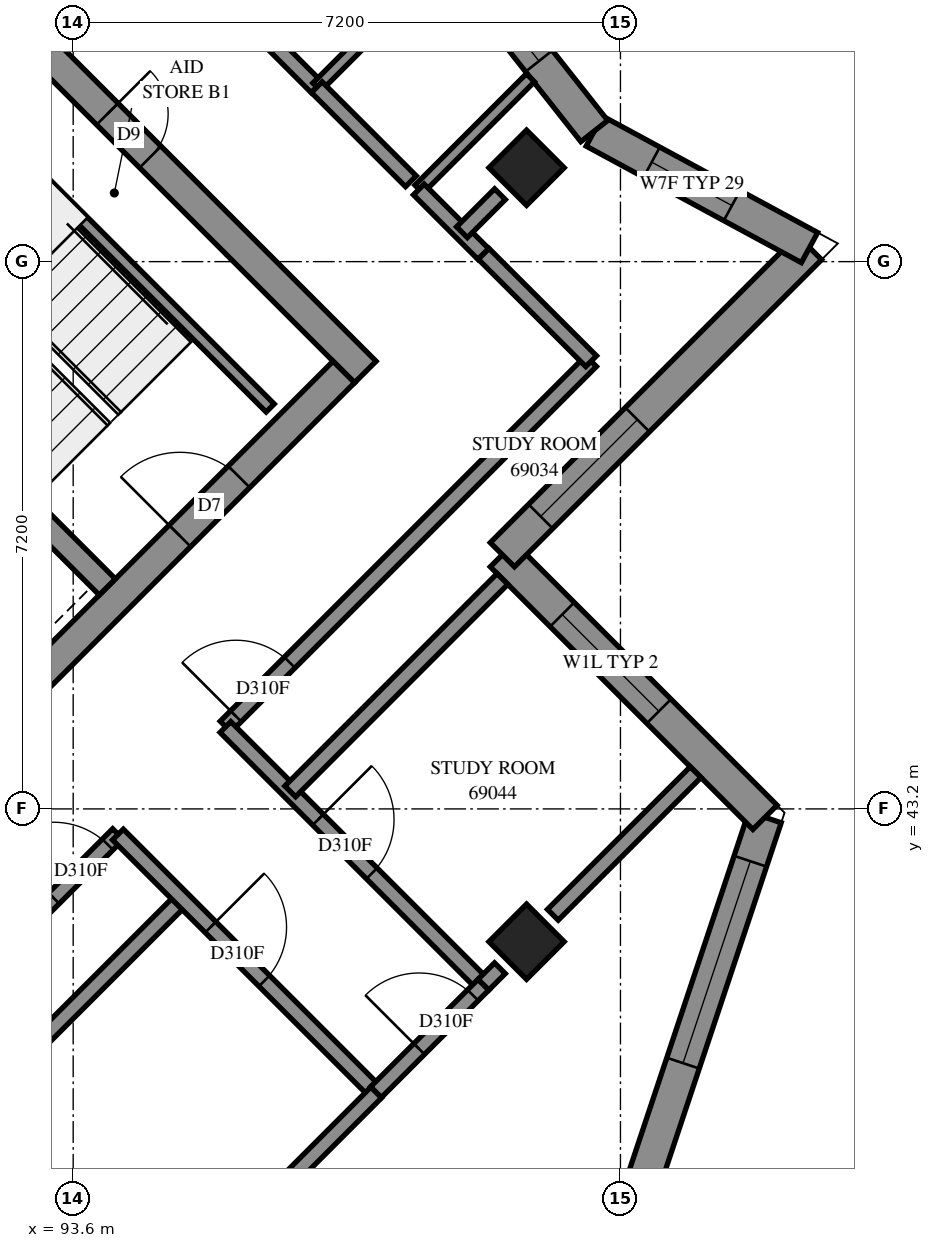
"""IFC4 building model, lengths in metres.
Left out: names, types, materials, properties, quantities, classifications, styles, units other than length and angle.
Written with IfcOpenShell. Run it as: python <this file> out.ifc"""

import sys

from ifc_helpers import new_model, si_unit, direction, frame, frame_2d, origin, origin_2d, place, context, subcontext, project, spatial, polyline, rectangle, outline, extrude, element, fill, save


model = new_model("IFC4")
c1 = context("Model", 3, precision=1e-05, world=origin(), true_north=direction((0.0, 1.0)))
c2 = subcontext(c1, "Body", "Model", "MODEL_VIEW")
j1 = project(units=[si_unit("LENGTHUNIT", "METRE"), si_unit("PLANEANGLEUNIT", "RADIAN")], contexts=[c1])
p1 = place(None, origin())
s1 = spatial("IfcSite", under=j1, at=p1, CompositionType="ELEMENT")
p2 = place(p1, origin())
s2 = spatial("IfcBuilding", under=s1, at=p2, CompositionType="ELEMENT")
p3 = place(p2, frame((0.0, 0.0, 254.0)))
s3 = spatial("IfcBuildingStorey", under=s2, at=p3, CompositionType="ELEMENT", Elevation=254.0)
for number, where, z_axis, x_axis in (
    (1, (99.565, 51.635, 0.0), (0.0, 0.0, 1.0), (0.707, -0.707, 0.0)),
    (2, (99.565, 41.453, 0.0), (0.0, 0.0, 1.0), (0.707, -0.707, 0.0)),
):
    element("IfcColumn", number, at=place(p3, frame(where, z_axis=z_axis, x_axis=x_axis)), inside=s3, PredefinedType="COLUMN", context=c2, shape_type="SweptSolid", body=[
        extrude(rectangle(XDim=0.7, YDim=0.7, at=origin_2d()), origin(), (0.0, 0.0, 1.0), 3.1),
    ])
p4 = place(p3, frame((86.695, 59.696, -0.3), z_axis=(0.0, 0.0, 1.0), x_axis=(0.7071100706, -0.7071034917, 0.0)))
e3 = element("IfcWall", 3, at=p4, inside=s3, PredefinedType="SHEAR", context=c2, shape_type="SweptSolid", body=[
    extrude(rectangle(XDim=15.2, YDim=0.4, at=frame_2d((7.6, 0.0))), origin(), (0.0, 0.0, 1.0), 2.7),
])
p5 = place(p4, frame((10.4, 0.0, 0.3)))
e4 = element("IfcOpeningElement", 4, at=p5, cuts=e3, PredefinedType="OPENING", context=c2, shape_type="SweptSolid", body=[
    extrude(rectangle(XDim=0.8, YDim=2.1, at=frame_2d((0.4, 1.05))), frame((0.0, 0.21, 0.0), z_axis=(0.0, -1.0, 0.0), x_axis=(1.0, 0.0, 0.0)), (0.0, 0.0, 1.0), 0.42),
])
p6 = place(p3, frame((86.978, 38.766, -0.3), z_axis=(0.0, 0.0, 1.0), x_axis=(0.7071067812, 0.7071067812, 0.0)))
e5 = element("IfcWall", 5, at=p6, inside=s3, PredefinedType="SHEAR", context=c2, shape_type="SweptSolid", body=[
    extrude(rectangle(XDim=14.4, YDim=0.4, at=frame_2d((7.2, 0.0))), origin(), (0.0, 0.0, 1.0), 2.7),
])
p7 = place(p6, frame((4.55, 0.0, 0.3)))
e6 = element("IfcOpeningElement", 6, at=p7, cuts=e5, PredefinedType="OPENING", context=c2, shape_type="SweptSolid", body=[
    extrude(rectangle(XDim=1.1, YDim=2.1, at=frame_2d((0.55, 1.05))), frame((0.0, 0.21, 0.0), z_axis=(0.0, -1.0, 0.0), x_axis=(1.0, 0.0, 0.0)), (0.0, 0.0, 1.0), 0.42),
])
p8 = place(p6, frame((11.35, 0.0, 0.3)))
e7 = element("IfcOpeningElement", 7, at=p8, cuts=e5, PredefinedType="OPENING", context=c2, shape_type="SweptSolid", body=[
    extrude(rectangle(XDim=1.1, YDim=2.1, at=frame_2d((0.55, 1.05))), frame((0.0, 0.21, 0.0), z_axis=(0.0, -1.0, 0.0), x_axis=(1.0, 0.0, 0.0)), (0.0, 0.0, 1.0), 0.42),
])
p9 = place(p3, frame((88.958, 51.211, 0.0), z_axis=(0.0, 0.0, 1.0), x_axis=(0.7070998367, -0.7071137256, 0.0)))
e8 = element("IfcWall", 8, at=p9, inside=s3, PredefinedType="SOLIDWALL", context=c2, shape_type="SweptSolid", body=[
    extrude(rectangle(XDim=7.2, YDim=0.3, at=frame_2d((3.6, 0.0))), origin(), (0.0, 0.0, 1.0), 3.1),
])
p10 = place(p3, frame((101.082, 38.232, 0.0), z_axis=(0.0, 0.0, 1.0), x_axis=(0.316227766, 0.9486832981, 0.0)))
e9 = element("IfcWall", 9, at=p10, inside=s3, PredefinedType="SOLIDWALL", context=c2, shape_type="SweptSolid", body=[
    extrude(outline(polyline([(-0.108, -0.225), (5.259, -0.225), (4.981, 0.225), (0.108, 0.225), (-0.108, -0.225)])), origin(), (0.0, 0.0, 1.0), 3.1),
])
p11 = place(p10, frame((1.711, 0.0, 0.45)))
e10 = element("IfcOpeningElement", 10, at=p11, cuts=e9, PredefinedType="OPENING", context=c2, shape_type="SweptSolid", body=[
    extrude(rectangle(XDim=2.8, YDim=2.55, at=frame_2d((1.4, 1.275))), frame((0.0, 0.235, 0.0), z_axis=(0.0, -1.0, 0.0), x_axis=(1.0, 0.0, 0.0)), (0.0, 0.0, 1.0), 0.47),
])
p12 = place(p3, frame((102.701, 43.089, 0.0), z_axis=(0.0, 0.0, 1.0), x_axis=(-0.7070965479, 0.7071170144, 0.0)))
e11 = element("IfcWall", 11, at=p12, inside=s3, PredefinedType="SOLIDWALL", context=c2, shape_type="SweptSolid", body=[
    extrude(outline(polyline([(-0.139, -0.225), (4.661, -0.225), (5.111, 0.225), (0.139, 0.225), (-0.139, -0.225)])), origin(), (0.0, 0.0, 1.0), 3.1),
])
p13 = place(p12, frame((1.974, 0.0, 0.6)))
e12 = element("IfcOpeningElement", 12, at=p13, cuts=e11, PredefinedType="OPENING", context=c2, shape_type="SweptSolid", body=[
    extrude(rectangle(XDim=1.8, YDim=1.9, at=frame_2d((0.9, 0.95))), frame((0.0, 0.235, 0.0), z_axis=(0.0, -1.0, 0.0), x_axis=(1.0, 0.0, 0.0)), (0.0, 0.0, 1.0), 0.47),
])
p14 = place(p3, frame((99.246, 46.544, 0.0), z_axis=(0.0, 0.0, 1.0), x_axis=(0.7071067812, 0.7071067812, 0.0)))
e13 = element("IfcWall", 13, at=p14, inside=s3, PredefinedType="SOLIDWALL", context=c2, shape_type="SweptSolid", body=[
    extrude(outline(polyline([(0.225, -0.225), (6.016, -0.225), (5.413, 0.225), (-0.225, 0.225), (0.225, -0.225)])), origin(), (0.0, 0.0, 1.0), 3.1),
])
p15 = place(p14, frame((0.713, 0.0, 0.6)))
e14 = element("IfcOpeningElement", 14, at=p15, cuts=e13, PredefinedType="OPENING", context=c2, shape_type="SweptSolid", body=[
    extrude(rectangle(XDim=1.8, YDim=1.9, at=frame_2d((0.9, 0.95))), frame((0.0, 0.235, 0.0), z_axis=(0.0, -1.0, 0.0), x_axis=(1.0, 0.0, 0.0)), (0.0, 0.0, 1.0), 0.47),
])
p16 = place(p3, frame((103.287, 50.585, 0.0), z_axis=(0.0, 0.0, 1.0), x_axis=(-0.8793857115, 0.4761100403, 0.0)))
e15 = element("IfcWall", 15, at=p16, inside=s3, PredefinedType="SOLIDWALL", context=c2, shape_type="SweptSolid", body=[
    extrude(outline(polyline([(-0.302, -0.225), (3.173, -0.225), (3.266, 0.225), (0.302, 0.225), (-0.302, -0.225)])), origin(), (0.0, 0.0, 1.0), 3.1),
])
p17 = place(p16, frame((1.161, 0.0, 0.45)))
e16 = element("IfcOpeningElement", 16, at=p17, cuts=e15, PredefinedType="OPENING", context=c2, shape_type="SweptSolid", body=[
    extrude(rectangle(XDim=1.2, YDim=2.55, at=frame_2d((0.6, 1.275))), frame((0.0, 0.235, 0.0), z_axis=(0.0, -1.0, 0.0), x_axis=(1.0, 0.0, 0.0)), (0.0, 0.0, 1.0), 0.47),
])
p18 = place(p3, frame((100.456, 52.118, 0.0), z_axis=(0.0, 0.0, 1.0), x_axis=(-0.6198499423, 0.7847203636, 0.0)))
e17 = element("IfcWall", 17, at=p18, inside=s3, PredefinedType="SOLIDWALL", context=c2, shape_type="SweptSolid", body=[
    extrude(outline(polyline([(0.046, -0.225), (3.4, -0.225), (3.347, 0.225), (-0.046, 0.225), (0.046, -0.225)])), origin(), (0.0, 0.0, 1.0), 3.1),
])
p19 = place(p18, frame((1.174, 0.0, 0.45)))
e18 = element("IfcOpeningElement", 18, at=p19, cuts=e17, PredefinedType="OPENING", context=c2, shape_type="SweptSolid", body=[
    extrude(rectangle(XDim=1.2, YDim=2.55, at=frame_2d((0.6, 1.275))), frame((0.0, 0.235, 0.0), z_axis=(0.0, -1.0, 0.0), x_axis=(1.0, 0.0, 0.0)), (0.0, 0.0, 1.0), 0.47),
])
p20 = place(p3, frame((91.313, 53.354, 0.0), z_axis=(0.0, 0.0, 1.0), x_axis=(0.7071140275, -0.7070995348, 0.0)))
e19 = element("IfcWall", 19, at=p20, inside=s3, PredefinedType="PARTITIONING", context=c2, shape_type="SweptSolid", body=[
    extrude(rectangle(XDim=6.9, YDim=0.15, at=frame_2d((3.45, 0.0))), origin(), (0.0, 0.0, 1.0), 3.1),
])
p21 = place(p3, frame((84.944, 31.927, 0.0), z_axis=(0.0, 0.0, 1.0), x_axis=(0.7071768334, 0.7070367221, 0.0)))
e20 = element("IfcWall", 20, at=p21, inside=s3, PredefinedType="PARTITIONING", context=c2, shape_type="SweptSolid", body=[
    extrude(rectangle(XDim=14.274, YDim=0.2, at=frame_2d((7.137, 0.0))), origin(), (0.0, 0.0, 1.0), 3.1),
])
p22 = place(p3, frame((86.836, 35.514, 0.0), z_axis=(0.0, 0.0, 1.0), x_axis=(0.7071067812, 0.7071067812, 0.0)))
e21 = element("IfcWall", 21, at=p22, inside=s3, PredefinedType="PARTITIONING", context=c2, shape_type="SweptSolid", body=[
    extrude(rectangle(XDim=10.4, YDim=0.2, at=frame_2d((5.2, 0.0))), origin(), (0.0, 0.0, 1.0), 3.1),
])
p23 = place(p22, frame((9.207, 0.0, 0.0)))
e22 = element("IfcOpeningElement", 22, at=p23, cuts=e21, PredefinedType="OPENING", context=c2, shape_type="SweptSolid", body=[
    extrude(rectangle(XDim=1.0, YDim=2.1, at=frame_2d((0.5, 1.05))), frame((0.0, 0.11, 0.0), z_axis=(0.0, -1.0, 0.0), x_axis=(1.0, 0.0, 0.0)), (0.0, 0.0, 1.0), 0.22),
])
p24 = place(p3, frame((95.605, 44.283, 0.0), z_axis=(0.0, 0.0, 1.0), x_axis=(0.7071067812, 0.7071067812, 0.0)))
e23 = element("IfcWall", 23, at=p24, inside=s3, PredefinedType="PARTITIONING", context=c2, shape_type="SweptSolid", body=[
    extrude(rectangle(XDim=6.8, YDim=0.2, at=frame_2d((3.4, 0.0))), origin(), (0.0, 0.0, 1.0), 3.1),
])
p25 = place(p24, frame((0.193, 0.0, 0.0)))
e24 = element("IfcOpeningElement", 24, at=p25, cuts=e23, PredefinedType="OPENING", context=c2, shape_type="SweptSolid", body=[
    extrude(rectangle(XDim=1.0, YDim=2.1, at=frame_2d((0.5, 1.05))), frame((0.0, 0.11, 0.0), z_axis=(0.0, -1.0, 0.0), x_axis=(1.0, 0.0, 0.0)), (0.0, 0.0, 1.0), 0.22),
])
p26 = place(p3, frame((95.603, 44.277, 0.0), z_axis=(0.0, 0.0, 1.0), x_axis=(0.7071067812, -0.7071067812, 0.0)))
e25 = element("IfcWall", 25, at=p26, inside=s3, PredefinedType="PARTITIONING", context=c2, shape_type="SweptSolid", body=[
    extrude(rectangle(XDim=4.797, YDim=0.2, at=frame_2d((2.398, 0.0))), origin(), (0.0, 0.0, 1.0), 3.1),
])
p27 = place(p26, frame((1.723, 0.0, 0.0)))
e26 = element("IfcOpeningElement", 26, at=p27, cuts=e25, PredefinedType="OPENING", context=c2, shape_type="SweptSolid", body=[
    extrude(rectangle(XDim=1.0, YDim=2.1, at=frame_2d((0.5, 1.05))), frame((0.0, 0.11, 0.0), z_axis=(0.0, -1.0, 0.0), x_axis=(1.0, 0.0, 0.0)), (0.0, 0.0, 1.0), 0.22),
])
p28 = place(p3, frame((94.189, 42.863, 0.0), z_axis=(0.0, 0.0, 1.0), x_axis=(0.7071067812, -0.7071067812, 0.0)))
e27 = element("IfcWall", 27, at=p28, inside=s3, PredefinedType="PARTITIONING", context=c2, shape_type="SweptSolid", body=[
    extrude(rectangle(XDim=4.797, YDim=0.2, at=frame_2d((2.398, 0.0))), origin(), (0.0, 0.0, 1.0), 3.1),
])
p29 = place(p28, frame((1.723, 0.0, 0.0)))
e28 = element("IfcOpeningElement", 28, at=p29, cuts=e27, PredefinedType="OPENING", context=c2, shape_type="SweptSolid", body=[
    extrude(rectangle(XDim=1.0, YDim=2.1, at=frame_2d((0.5, 1.05))), frame((0.0, 0.11, 0.0), z_axis=(0.0, -1.0, 0.0), x_axis=(1.0, 0.0, 0.0)), (0.0, 0.0, 1.0), 0.22),
])
p30 = place(p3, frame((93.621, 55.875, 0.0), z_axis=(0.0, 0.0, 1.0), x_axis=(0.7071067812, -0.7071067812, 0.0)))
e29 = element("IfcWall", 29, at=p30, inside=s3, PredefinedType="PARTITIONING", context=c2, shape_type="SweptSolid", body=[
    extrude(rectangle(XDim=4.5, YDim=0.2, at=frame_2d((2.25, 0.0))), origin(), (0.0, 0.0, 1.0), 3.1),
])
p31 = place(p30, frame((0.467, 0.0, 0.0)))
e30 = element("IfcOpeningElement", 30, at=p31, cuts=e29, PredefinedType="OPENING", context=c2, shape_type="SweptSolid", body=[
    extrude(rectangle(XDim=0.9, YDim=2.1, at=frame_2d((0.45, 1.05))), frame((0.0, 0.11, 0.0), z_axis=(0.0, -1.0, 0.0), x_axis=(1.0, 0.0, 0.0)), (0.0, 0.0, 1.0), 0.22),
])
p32 = place(p3, frame((94.828, 36.709, 0.0), z_axis=(0.0, 0.0, 1.0), x_axis=(0.7068506295, 0.7073628401, 0.0)))
e31 = element("IfcWall", 31, at=p32, inside=s3, PredefinedType="PARTITIONING", context=c2, shape_type="SweptSolid", body=[
    extrude(rectangle(XDim=3.905, YDim=0.2, at=frame_2d((1.952, 0.0))), origin(), (0.0, 0.0, 1.0), 2.6),
])
p33 = place(p3, frame((96.455, 43.431, 0.0), z_axis=(0.0, 0.0, 1.0), x_axis=(0.7068409254, 0.707372537, 0.0)))
e32 = element("IfcWall", 32, at=p33, inside=s3, PredefinedType="PARTITIONING", context=c2, shape_type="SweptSolid", body=[
    extrude(rectangle(XDim=3.95, YDim=0.2, at=frame_2d((1.975, 0.0))), origin(), (0.0, 0.0, 1.0), 3.1),
])
p34 = place(p3, frame((99.91, 41.807, 0.0), z_axis=(0.0, 0.0, 1.0), x_axis=(0.7075021757, 0.7067111654, 0.0)))
e33 = element("IfcWall", 33, at=p34, inside=s3, PredefinedType="PARTITIONING", context=c2, shape_type="SweptSolid", body=[
    extrude(rectangle(XDim=2.655, YDim=0.2, at=frame_2d((1.327, 0.0))), origin(), (0.0, 0.0, 1.0), 3.1),
])
p35 = place(p3, frame((96.806, 52.696, 0.0), z_axis=(0.0, 0.0, 1.0), x_axis=(0.707085007, 0.7071285547, 0.0)))
e34 = element("IfcWall", 34, at=p35, inside=s3, PredefinedType="PARTITIONING", context=c2, shape_type="SweptSolid", body=[
    extrude(rectangle(XDim=2.296, YDim=0.15, at=frame_2d((1.148, 0.0))), origin(), (0.0, 0.0, 1.0), 3.1),
])
p36 = place(p35, frame((1.189, 0.0, 0.0)))
e35 = element("IfcOpeningElement", 35, at=p36, cuts=e34, PredefinedType="OPENING", context=c2, shape_type="SweptSolid", body=[
    extrude(rectangle(XDim=0.8, YDim=2.1, at=frame_2d((0.4, 1.05))), frame((0.0, 0.085, 0.0), z_axis=(0.0, -1.0, 0.0), x_axis=(1.0, 0.0, 0.0)), (0.0, 0.0, 1.0), 0.17),
])
p37 = place(p3, frame((98.149, 51.353, 0.0), z_axis=(0.0, 0.0, 1.0), x_axis=(0.7070826647, 0.7071308968, 0.0)))
e36 = element("IfcWall", 36, at=p37, inside=s3, PredefinedType="PARTITIONING", context=c2, shape_type="SweptSolid", body=[
    extrude(rectangle(XDim=2.073, YDim=0.15, at=frame_2d((1.037, 0.0))), origin(), (0.0, 0.0, 1.0), 3.1),
])
p38 = place(p3, frame((98.998, 50.504, 0.0), z_axis=(0.0, 0.0, 1.0), x_axis=(0.7076063266, -0.7066068826, 0.0)))
e37 = element("IfcWall", 37, at=p38, inside=s3, PredefinedType="PARTITIONING", context=c2, shape_type="SweptSolid", body=[
    extrude(rectangle(XDim=2.001, YDim=0.2, at=frame_2d((1.001, 0.0))), origin(), (0.0, 0.0, 1.0), 3.1),
])
p39 = place(p3, frame((97.584, 39.474, 0.0), z_axis=(0.0, 0.0, 1.0), x_axis=(0.7071067812, 0.7071067812, 0.0)))
e38 = element("IfcWall", 38, at=p39, inside=s3, PredefinedType="PARTITIONING", context=c2, shape_type="SweptSolid", body=[
    extrude(rectangle(XDim=2.0, YDim=0.2, at=frame_2d((1.0, 0.0))), origin(), (0.0, 0.0, 1.0), 2.6),
])
p40 = place(p39, frame((0.803, 0.0, 0.0)))
e39 = element("IfcOpeningElement", 39, at=p40, cuts=e38, PredefinedType="OPENING", context=c2, shape_type="SweptSolid", body=[
    extrude(rectangle(XDim=1.0, YDim=2.1, at=frame_2d((0.5, 1.05))), frame((0.0, 0.11, 0.0), z_axis=(0.0, -1.0, 0.0), x_axis=(1.0, 0.0, 0.0)), (0.0, 0.0, 1.0), 0.22),
])
p41 = place(p3, frame((96.805, 52.695, 0.0), z_axis=(0.0, 0.0, 1.0), x_axis=(0.7073923078, -0.7068211392, 0.0)))
e40 = element("IfcWall", 40, at=p41, inside=s3, PredefinedType="PARTITIONING", context=c2, shape_type="SweptSolid", body=[
    extrude(rectangle(XDim=1.751, YDim=0.2, at=frame_2d((0.875, 0.0))), origin(), (0.0, 0.0, 1.0), 3.1),
])
p42 = place(p3, frame((98.147, 51.349, 0.0), z_axis=(0.0, 0.0, 1.0), x_axis=(0.7071067812, -0.7071067812, 0.0)))
e41 = element("IfcWall", 41, at=p42, inside=s3, PredefinedType="PARTITIONING", context=c2, shape_type="SweptSolid", body=[
    extrude(rectangle(XDim=1.199, YDim=0.2, at=frame_2d((0.6, 0.0))), origin(), (0.0, 0.0, 1.0), 3.1),
])
p43 = place(p3, frame((98.715, 50.787, 0.0), z_axis=(0.0, 0.0, 1.0), x_axis=(0.7071067812, 0.7071067812, 0.0)))
e42 = element("IfcWall", 42, at=p43, inside=s3, PredefinedType="PARTITIONING", context=c2, shape_type="SweptSolid", body=[
    extrude(rectangle(XDim=0.707, YDim=0.2, at=frame_2d((0.353, 0.0))), origin(), (0.0, 0.0, 1.0), 3.1),
])
p44 = place(p3, frame((98.998, 40.888, 0.0), z_axis=(0.0, 0.0, 1.0), x_axis=(0.7071067812, 0.7071067812, 0.0)))
e43 = element("IfcWall", 43, at=p44, inside=s3, PredefinedType="PARTITIONING", context=c2, shape_type="SweptSolid", body=[
    extrude(rectangle(XDim=0.305, YDim=0.2, at=frame_2d((0.153, 0.0))), origin(), (0.0, 0.0, 1.0), 2.6),
])
p45 = place(p11, origin())
e44 = element("IfcWindow", 44, at=p45, inside=s3, PartitioningType="SINGLE_PANEL", PredefinedType="WINDOW", context=c2, shape_type="SweptSolid", body=[
    extrude(rectangle(XDim=2.8, YDim=2.55, at=frame_2d((1.4, 1.275))), frame((0.0, 0.205, 0.0), z_axis=(0.0, -1.0, 0.0), x_axis=(1.0, 0.0, 0.0)), (0.0, 0.0, 1.0), 0.06),
])
fill(e10, e44)
p46 = place(p13, origin())
e45 = element("IfcWindow", 45, at=p46, inside=s3, PartitioningType="SINGLE_PANEL", PredefinedType="WINDOW", context=c2, shape_type="SweptSolid", body=[
    extrude(rectangle(XDim=1.8, YDim=1.9, at=frame_2d((0.9, 0.95))), frame((0.0, 0.205, 0.0), z_axis=(0.0, -1.0, 0.0), x_axis=(1.0, 0.0, 0.0)), (0.0, 0.0, 1.0), 0.06),
])
fill(e12, e45)
p47 = place(p15, origin())
e46 = element("IfcWindow", 46, at=p47, inside=s3, PartitioningType="SINGLE_PANEL", PredefinedType="WINDOW", context=c2, shape_type="SweptSolid", body=[
    extrude(rectangle(XDim=1.8, YDim=1.9, at=frame_2d((0.9, 0.95))), frame((0.0, 0.205, 0.0), z_axis=(0.0, -1.0, 0.0), x_axis=(1.0, 0.0, 0.0)), (0.0, 0.0, 1.0), 0.06),
])
fill(e14, e46)
p48 = place(p17, origin())
e47 = element("IfcWindow", 47, at=p48, inside=s3, PartitioningType="SINGLE_PANEL", PredefinedType="WINDOW", context=c2, shape_type="SweptSolid", body=[
    extrude(rectangle(XDim=1.2, YDim=2.55, at=frame_2d((0.6, 1.275))), frame((0.0, 0.205, 0.0), z_axis=(0.0, -1.0, 0.0), x_axis=(1.0, 0.0, 0.0)), (0.0, 0.0, 1.0), 0.06),
])
fill(e16, e47)
p49 = place(p19, origin())
e48 = element("IfcWindow", 48, at=p49, inside=s3, PartitioningType="SINGLE_PANEL", PredefinedType="WINDOW", context=c2, shape_type="SweptSolid", body=[
    extrude(rectangle(XDim=1.2, YDim=2.55, at=frame_2d((0.6, 1.275))), frame((0.0, 0.205, 0.0), z_axis=(0.0, -1.0, 0.0), x_axis=(1.0, 0.0, 0.0)), (0.0, 0.0, 1.0), 0.06),
])
fill(e18, e48)
p50 = place(p5, origin())
e49 = element("IfcDoor", 49, at=p50, inside=s3, OperationType="SINGLE_SWING_RIGHT", PredefinedType="DOOR", context=c2, shape_type="SweptSolid", body=[
    extrude(rectangle(XDim=0.8, YDim=2.1, at=frame_2d((0.4, 1.05))), frame((0.0, 0.025, 0.0), z_axis=(0.0, -1.0, 0.0), x_axis=(1.0, 0.0, 0.0)), (0.0, 0.0, 1.0), 0.05),
])
fill(e4, e49)
p51 = place(p8, origin())
e50 = element("IfcDoor", 50, at=p51, inside=s3, OperationType="SINGLE_SWING_RIGHT", PredefinedType="DOOR", context=c2, shape_type="SweptSolid", body=[
    extrude(rectangle(XDim=1.1, YDim=2.1, at=frame_2d((0.55, 1.05))), frame((0.0, 0.025, 0.0), z_axis=(0.0, -1.0, 0.0), x_axis=(1.0, 0.0, 0.0)), (0.0, 0.0, 1.0), 0.05),
])
fill(e7, e50)
p52 = place(p25, origin())
e51 = element("IfcDoor", 51, at=p52, inside=s3, OperationType="SINGLE_SWING_LEFT", PredefinedType="DOOR", context=c2, shape_type="SweptSolid", body=[
    extrude(rectangle(XDim=1.0, YDim=2.1, at=frame_2d((0.5, 1.05))), frame((0.0, 0.025, 0.0), z_axis=(0.0, -1.0, 0.0), x_axis=(1.0, 0.0, 0.0)), (0.0, 0.0, 1.0), 0.05),
])
fill(e24, e51)
p53 = place(p23, origin())
e52 = element("IfcDoor", 52, at=p53, inside=s3, OperationType="SINGLE_SWING_RIGHT", PredefinedType="DOOR", context=c2, shape_type="SweptSolid", body=[
    extrude(rectangle(XDim=1.0, YDim=2.1, at=frame_2d((0.5, 1.05))), frame((0.0, 0.025, 0.0), z_axis=(0.0, -1.0, 0.0), x_axis=(1.0, 0.0, 0.0)), (0.0, 0.0, 1.0), 0.05),
])
fill(e22, e52)
p54 = place(p29, origin())
e53 = element("IfcDoor", 53, at=p54, inside=s3, OperationType="SINGLE_SWING_LEFT", PredefinedType="DOOR", context=c2, shape_type="SweptSolid", body=[
    extrude(rectangle(XDim=1.0, YDim=2.1, at=frame_2d((0.5, 1.05))), frame((0.0, 0.025, 0.0), z_axis=(0.0, -1.0, 0.0), x_axis=(1.0, 0.0, 0.0)), (0.0, 0.0, 1.0), 0.05),
])
fill(e28, e53)
p55 = place(p27, origin())
e54 = element("IfcDoor", 54, at=p55, inside=s3, OperationType="SINGLE_SWING_RIGHT", PredefinedType="DOOR", context=c2, shape_type="SweptSolid", body=[
    extrude(rectangle(XDim=1.0, YDim=2.1, at=frame_2d((0.5, 1.05))), frame((0.0, 0.025, 0.0), z_axis=(0.0, -1.0, 0.0), x_axis=(1.0, 0.0, 0.0)), (0.0, 0.0, 1.0), 0.05),
])
fill(e26, e54)
p56 = place(p40, origin())
e55 = element("IfcDoor", 55, at=p56, inside=s3, OperationType="SINGLE_SWING_RIGHT", PredefinedType="DOOR", context=c2, shape_type="SweptSolid", body=[
    extrude(rectangle(XDim=1.0, YDim=2.1, at=frame_2d((0.5, 1.05))), frame((0.0, 0.025, 0.0), z_axis=(0.0, -1.0, 0.0), x_axis=(1.0, 0.0, 0.0)), (0.0, 0.0, 1.0), 0.05),
])
fill(e39, e55)
save(model, sys.argv[1])
